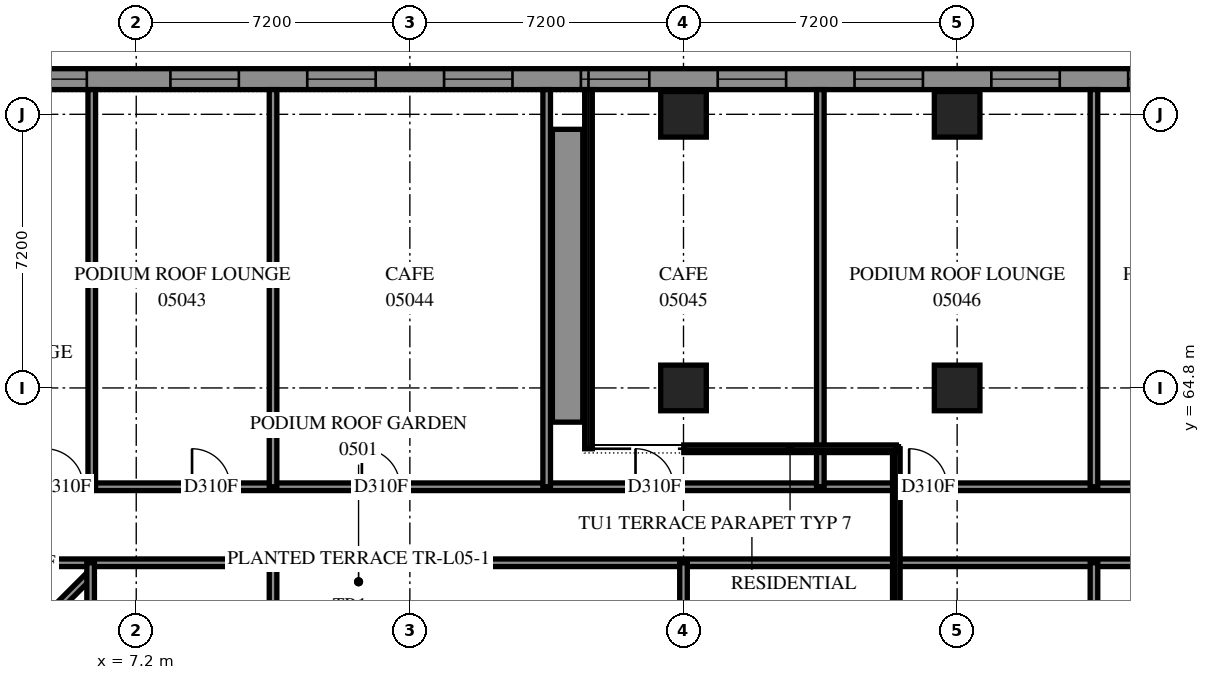
"""IFC4 building model, lengths in metres.
Left out: names, types, materials, properties, quantities, classifications, styles, units other than length and angle.
Written with IfcOpenShell. Run it as: python <this file> out.ifc"""

import sys

from ifc_helpers import new_model, si_unit, direction, frame, frame_2d, origin, origin_2d, place, context, subcontext, project, spatial, polyline, rectangle, outline, extrude, element, fill, save


model = new_model("IFC4")
c1 = context("Model", 3, precision=1e-05, world=origin(), true_north=direction((0.0, 1.0)))
c2 = subcontext(c1, "Body", "Model", "MODEL_VIEW")
j1 = project(units=[si_unit("LENGTHUNIT", "METRE"), si_unit("PLANEANGLEUNIT", "RADIAN")], contexts=[c1])
p1 = place(None, origin())
s1 = spatial("IfcSite", under=j1, at=p1, CompositionType="ELEMENT")
p2 = place(p1, origin())
s2 = spatial("IfcBuilding", under=s1, at=p2, CompositionType="ELEMENT")
p3 = place(p2, frame((0.0, 0.0, 22.8)))
s3 = spatial("IfcBuildingStorey", under=s2, at=p3, CompositionType="ELEMENT", Elevation=22.8)
for number, where, z_axis, x_axis in (
    (1, (21.6, 64.8, 0.0), (0.0, 0.0, 1.0), (1.0, 0.0, 0.0)),
    (2, (21.6, 72.0, 0.0), (0.0, 0.0, 1.0), (1.0, 0.0, 0.0)),
    (3, (28.8, 64.8, 0.0), (0.0, 0.0, 1.0), (1.0, 0.0, 0.0)),
    (4, (28.8, 72.0, 0.0), (0.0, 0.0, 1.0), (1.0, 0.0, 0.0)),
):
    element("IfcColumn", number, at=place(p3, frame(where, z_axis=z_axis, x_axis=x_axis)), inside=s3, PredefinedType="COLUMN", context=c2, shape_type="SweptSolid", body=[
        extrude(rectangle(XDim=1.2, YDim=1.2, at=origin_2d()), origin(), (0.0, 0.0, 1.0), 3.9),
    ])
p4 = place(p3, frame((79.583, 72.925, 0.0), z_axis=(0.0, 0.0, 1.0), x_axis=(-1.0, 0.0, 0.0)))
e5 = element("IfcWall", 5, at=p4, inside=s3, PredefinedType="SOLIDWALL", context=c2, shape_type="SweptSolid", body=[
    extrude(outline(polyline([(-0.114, -0.275), (79.583, -0.275), (79.033, 0.275), (0.114, 0.275), (-0.114, -0.275)])), origin(), (0.0, 0.0, 1.0), 3.9),
])
p5 = place(p4, frame((1.249, 0.0, 0.7)))
e6 = element("IfcOpeningElement", 6, at=p5, cuts=e5, PredefinedType="OPENING", context=c2, shape_type="SweptSolid", body=[
    extrude(rectangle(XDim=1.8, YDim=2.4, at=frame_2d((0.9, 1.2))), frame((0.0, 0.285, 0.0), z_axis=(0.0, -1.0, 0.0), x_axis=(1.0, 0.0, 0.0)), (0.0, 0.0, 1.0), 0.57),
])
p6 = place(p4, frame((4.883, 0.0, 0.7)))
e7 = element("IfcOpeningElement", 7, at=p6, cuts=e5, PredefinedType="OPENING", context=c2, shape_type="SweptSolid", body=[
    extrude(rectangle(XDim=1.8, YDim=2.4, at=frame_2d((0.9, 1.2))), frame((0.0, 0.285, 0.0), z_axis=(0.0, -1.0, 0.0), x_axis=(1.0, 0.0, 0.0)), (0.0, 0.0, 1.0), 0.57),
])
p7 = place(p4, frame((8.483, 0.0, 0.7)))
e8 = element("IfcOpeningElement", 8, at=p7, cuts=e5, PredefinedType="OPENING", context=c2, shape_type="SweptSolid", body=[
    extrude(rectangle(XDim=1.8, YDim=2.4, at=frame_2d((0.9, 1.2))), frame((0.0, 0.285, 0.0), z_axis=(0.0, -1.0, 0.0), x_axis=(1.0, 0.0, 0.0)), (0.0, 0.0, 1.0), 0.57),
])
p8 = place(p4, frame((12.083, 0.0, 0.7)))
e9 = element("IfcOpeningElement", 9, at=p8, cuts=e5, PredefinedType="OPENING", context=c2, shape_type="SweptSolid", body=[
    extrude(rectangle(XDim=1.8, YDim=2.4, at=frame_2d((0.9, 1.2))), frame((0.0, 0.285, 0.0), z_axis=(0.0, -1.0, 0.0), x_axis=(1.0, 0.0, 0.0)), (0.0, 0.0, 1.0), 0.57),
])
p9 = place(p4, frame((15.683, 0.0, 0.7)))
e10 = element("IfcOpeningElement", 10, at=p9, cuts=e5, PredefinedType="OPENING", context=c2, shape_type="SweptSolid", body=[
    extrude(rectangle(XDim=1.8, YDim=2.4, at=frame_2d((0.9, 1.2))), frame((0.0, 0.285, 0.0), z_axis=(0.0, -1.0, 0.0), x_axis=(1.0, 0.0, 0.0)), (0.0, 0.0, 1.0), 0.57),
])
p10 = place(p4, frame((19.283, 0.0, 0.7)))
e11 = element("IfcOpeningElement", 11, at=p10, cuts=e5, PredefinedType="OPENING", context=c2, shape_type="SweptSolid", body=[
    extrude(rectangle(XDim=1.8, YDim=2.4, at=frame_2d((0.9, 1.2))), frame((0.0, 0.285, 0.0), z_axis=(0.0, -1.0, 0.0), x_axis=(1.0, 0.0, 0.0)), (0.0, 0.0, 1.0), 0.57),
])
p11 = place(p4, frame((22.883, 0.0, 0.7)))
e12 = element("IfcOpeningElement", 12, at=p11, cuts=e5, PredefinedType="OPENING", context=c2, shape_type="SweptSolid", body=[
    extrude(rectangle(XDim=1.8, YDim=2.4, at=frame_2d((0.9, 1.2))), frame((0.0, 0.285, 0.0), z_axis=(0.0, -1.0, 0.0), x_axis=(1.0, 0.0, 0.0)), (0.0, 0.0, 1.0), 0.57),
])
p12 = place(p4, frame((26.483, 0.0, 0.7)))
e13 = element("IfcOpeningElement", 13, at=p12, cuts=e5, PredefinedType="OPENING", context=c2, shape_type="SweptSolid", body=[
    extrude(rectangle(XDim=1.8, YDim=2.4, at=frame_2d((0.9, 1.2))), frame((0.0, 0.285, 0.0), z_axis=(0.0, -1.0, 0.0), x_axis=(1.0, 0.0, 0.0)), (0.0, 0.0, 1.0), 0.57),
])
p13 = place(p4, frame((30.083, 0.0, 0.7)))
e14 = element("IfcOpeningElement", 14, at=p13, cuts=e5, PredefinedType="OPENING", context=c2, shape_type="SweptSolid", body=[
    extrude(rectangle(XDim=1.8, YDim=2.4, at=frame_2d((0.9, 1.2))), frame((0.0, 0.285, 0.0), z_axis=(0.0, -1.0, 0.0), x_axis=(1.0, 0.0, 0.0)), (0.0, 0.0, 1.0), 0.57),
])
p14 = place(p4, frame((33.683, 0.0, 0.7)))
e15 = element("IfcOpeningElement", 15, at=p14, cuts=e5, PredefinedType="OPENING", context=c2, shape_type="SweptSolid", body=[
    extrude(rectangle(XDim=1.8, YDim=2.4, at=frame_2d((0.9, 1.2))), frame((0.0, 0.285, 0.0), z_axis=(0.0, -1.0, 0.0), x_axis=(1.0, 0.0, 0.0)), (0.0, 0.0, 1.0), 0.57),
])
p15 = place(p4, frame((37.283, 0.0, 0.7)))
e16 = element("IfcOpeningElement", 16, at=p15, cuts=e5, PredefinedType="OPENING", context=c2, shape_type="SweptSolid", body=[
    extrude(rectangle(XDim=1.8, YDim=2.4, at=frame_2d((0.9, 1.2))), frame((0.0, 0.285, 0.0), z_axis=(0.0, -1.0, 0.0), x_axis=(1.0, 0.0, 0.0)), (0.0, 0.0, 1.0), 0.57),
])
p16 = place(p4, frame((40.883, 0.0, 0.7)))
e17 = element("IfcOpeningElement", 17, at=p16, cuts=e5, PredefinedType="OPENING", context=c2, shape_type="SweptSolid", body=[
    extrude(rectangle(XDim=1.8, YDim=2.4, at=frame_2d((0.9, 1.2))), frame((0.0, 0.285, 0.0), z_axis=(0.0, -1.0, 0.0), x_axis=(1.0, 0.0, 0.0)), (0.0, 0.0, 1.0), 0.57),
])
p17 = place(p4, frame((44.483, 0.0, 0.7)))
e18 = element("IfcOpeningElement", 18, at=p17, cuts=e5, PredefinedType="OPENING", context=c2, shape_type="SweptSolid", body=[
    extrude(rectangle(XDim=1.8, YDim=2.4, at=frame_2d((0.9, 1.2))), frame((0.0, 0.285, 0.0), z_axis=(0.0, -1.0, 0.0), x_axis=(1.0, 0.0, 0.0)), (0.0, 0.0, 1.0), 0.57),
])
p18 = place(p4, frame((48.083, 0.0, 0.7)))
e19 = element("IfcOpeningElement", 19, at=p18, cuts=e5, PredefinedType="OPENING", context=c2, shape_type="SweptSolid", body=[
    extrude(rectangle(XDim=1.8, YDim=2.4, at=frame_2d((0.9, 1.2))), frame((0.0, 0.285, 0.0), z_axis=(0.0, -1.0, 0.0), x_axis=(1.0, 0.0, 0.0)), (0.0, 0.0, 1.0), 0.57),
])
p19 = place(p4, frame((51.683, 0.0, 0.7)))
e20 = element("IfcOpeningElement", 20, at=p19, cuts=e5, PredefinedType="OPENING", context=c2, shape_type="SweptSolid", body=[
    extrude(rectangle(XDim=1.8, YDim=2.4, at=frame_2d((0.9, 1.2))), frame((0.0, 0.285, 0.0), z_axis=(0.0, -1.0, 0.0), x_axis=(1.0, 0.0, 0.0)), (0.0, 0.0, 1.0), 0.57),
])
p20 = place(p4, frame((55.283, 0.0, 0.7)))
e21 = element("IfcOpeningElement", 21, at=p20, cuts=e5, PredefinedType="OPENING", context=c2, shape_type="SweptSolid", body=[
    extrude(rectangle(XDim=1.8, YDim=2.4, at=frame_2d((0.9, 1.2))), frame((0.0, 0.285, 0.0), z_axis=(0.0, -1.0, 0.0), x_axis=(1.0, 0.0, 0.0)), (0.0, 0.0, 1.0), 0.57),
])
p21 = place(p4, frame((58.883, 0.0, 0.7)))
e22 = element("IfcOpeningElement", 22, at=p21, cuts=e5, PredefinedType="OPENING", context=c2, shape_type="SweptSolid", body=[
    extrude(rectangle(XDim=1.8, YDim=2.4, at=frame_2d((0.9, 1.2))), frame((0.0, 0.285, 0.0), z_axis=(0.0, -1.0, 0.0), x_axis=(1.0, 0.0, 0.0)), (0.0, 0.0, 1.0), 0.57),
])
p22 = place(p4, frame((62.483, 0.0, 0.7)))
e23 = element("IfcOpeningElement", 23, at=p22, cuts=e5, PredefinedType="OPENING", context=c2, shape_type="SweptSolid", body=[
    extrude(rectangle(XDim=1.8, YDim=2.4, at=frame_2d((0.9, 1.2))), frame((0.0, 0.285, 0.0), z_axis=(0.0, -1.0, 0.0), x_axis=(1.0, 0.0, 0.0)), (0.0, 0.0, 1.0), 0.57),
])
p23 = place(p4, frame((66.083, 0.0, 0.7)))
e24 = element("IfcOpeningElement", 24, at=p23, cuts=e5, PredefinedType="OPENING", context=c2, shape_type="SweptSolid", body=[
    extrude(rectangle(XDim=1.8, YDim=2.4, at=frame_2d((0.9, 1.2))), frame((0.0, 0.285, 0.0), z_axis=(0.0, -1.0, 0.0), x_axis=(1.0, 0.0, 0.0)), (0.0, 0.0, 1.0), 0.57),
])
p24 = place(p4, frame((69.683, 0.0, 0.7)))
e25 = element("IfcOpeningElement", 25, at=p24, cuts=e5, PredefinedType="OPENING", context=c2, shape_type="SweptSolid", body=[
    extrude(rectangle(XDim=1.8, YDim=2.4, at=frame_2d((0.9, 1.2))), frame((0.0, 0.285, 0.0), z_axis=(0.0, -1.0, 0.0), x_axis=(1.0, 0.0, 0.0)), (0.0, 0.0, 1.0), 0.57),
])
p25 = place(p4, frame((73.683, 0.0, 0.7)))
e26 = element("IfcOpeningElement", 26, at=p25, cuts=e5, PredefinedType="OPENING", context=c2, shape_type="SweptSolid", body=[
    extrude(rectangle(XDim=1.8, YDim=2.4, at=frame_2d((0.9, 1.2))), frame((0.0, 0.285, 0.0), z_axis=(0.0, -1.0, 0.0), x_axis=(1.0, 0.0, 0.0)), (0.0, 0.0, 1.0), 0.57),
])
p26 = place(p4, frame((76.508, 0.0, 0.7)))
e27 = element("IfcOpeningElement", 27, at=p26, cuts=e5, PredefinedType="OPENING", context=c2, shape_type="SweptSolid", body=[
    extrude(rectangle(XDim=1.8, YDim=2.4, at=frame_2d((0.9, 1.2))), frame((0.0, 0.285, 0.0), z_axis=(0.0, -1.0, 0.0), x_axis=(1.0, 0.0, 0.0)), (0.0, 0.0, 1.0), 0.57),
])
p27 = place(p3, frame((19.1, 63.2, 0.0), z_axis=(0.0, 0.0, 1.0), x_axis=(0.0, 1.0, 0.0)))
e28 = element("IfcWall", 28, at=p27, inside=s3, PredefinedType="PARAPET", context=c2, shape_type="SweptSolid", body=[
    extrude(outline(polyline([(0.1, -0.1), (9.45, -0.1), (9.45, 0.1), (-0.1, 0.1), (0.1, -0.1)])), origin(), (0.0, 0.0, 1.0), 0.25),
])
p28 = place(p3, frame((0.002, 60.2, 0.0), z_axis=(0.0, 0.0, 1.0), x_axis=(1.0, 0.0, 0.0)))
e29 = element("IfcWall", 29, at=p28, inside=s3, PredefinedType="PARTITIONING", context=c2, shape_type="SweptSolid", body=[
    extrude(rectangle(XDim=54.598, YDim=0.2, at=frame_2d((27.299, 0.0))), origin(), (0.0, 0.0, 1.0), 3.9),
])
p29 = place(p28, frame((3.863, 0.0, 0.0)))
e30 = element("IfcOpeningElement", 30, at=p29, cuts=e29, PredefinedType="OPENING", context=c2, shape_type="SweptSolid", body=[
    extrude(rectangle(XDim=1.0, YDim=2.1, at=frame_2d((0.5, 1.05))), frame((0.0, 0.11, 0.0), z_axis=(0.0, -1.0, 0.0), x_axis=(1.0, 0.0, 0.0)), (0.0, 0.0, 1.0), 0.22),
])
p30 = place(p3, frame((0.002, 62.2, 0.0), z_axis=(0.0, 0.0, 1.0), x_axis=(1.0, 0.0, 0.0)))
e31 = element("IfcWall", 31, at=p30, inside=s3, PredefinedType="PARTITIONING", context=c2, shape_type="SweptSolid", body=[
    extrude(rectangle(XDim=54.598, YDim=0.2, at=frame_2d((27.299, 0.0))), origin(), (0.0, 0.0, 1.0), 3.9),
])
p31 = place(p30, frame((8.667, 0.0, 0.0)))
e32 = element("IfcOpeningElement", 32, at=p31, cuts=e31, PredefinedType="OPENING", context=c2, shape_type="SweptSolid", body=[
    extrude(rectangle(XDim=1.0, YDim=2.1, at=frame_2d((0.5, 1.05))), frame((0.0, 0.11, 0.0), z_axis=(0.0, -1.0, 0.0), x_axis=(1.0, 0.0, 0.0)), (0.0, 0.0, 1.0), 0.22),
])
p32 = place(p30, frame((13.136, 0.0, 0.0)))
e33 = element("IfcOpeningElement", 33, at=p32, cuts=e31, PredefinedType="OPENING", context=c2, shape_type="SweptSolid", body=[
    extrude(rectangle(XDim=1.0, YDim=2.1, at=frame_2d((0.5, 1.05))), frame((0.0, 0.11, 0.0), z_axis=(0.0, -1.0, 0.0), x_axis=(1.0, 0.0, 0.0)), (0.0, 0.0, 1.0), 0.22),
])
p33 = place(p30, frame((20.335, 0.0, 0.0)))
e34 = element("IfcOpeningElement", 34, at=p33, cuts=e31, PredefinedType="OPENING", context=c2, shape_type="SweptSolid", body=[
    extrude(rectangle(XDim=1.0, YDim=2.1, at=frame_2d((0.5, 1.05))), frame((0.0, 0.11, 0.0), z_axis=(0.0, -1.0, 0.0), x_axis=(1.0, 0.0, 0.0)), (0.0, 0.0, 1.0), 0.22),
])
p34 = place(p30, frame((27.535, 0.0, 0.0)))
e35 = element("IfcOpeningElement", 35, at=p34, cuts=e31, PredefinedType="OPENING", context=c2, shape_type="SweptSolid", body=[
    extrude(rectangle(XDim=1.0, YDim=2.1, at=frame_2d((0.5, 1.05))), frame((0.0, 0.11, 0.0), z_axis=(0.0, -1.0, 0.0), x_axis=(1.0, 0.0, 0.0)), (0.0, 0.0, 1.0), 0.22),
])
p35 = place(p30, frame((34.736, 0.0, 0.0)))
e36 = element("IfcOpeningElement", 36, at=p35, cuts=e31, PredefinedType="OPENING", context=c2, shape_type="SweptSolid", body=[
    extrude(rectangle(XDim=1.0, YDim=2.1, at=frame_2d((0.5, 1.05))), frame((0.0, 0.11, 0.0), z_axis=(0.0, -1.0, 0.0), x_axis=(1.0, 0.0, 0.0)), (0.0, 0.0, 1.0), 0.22),
])
p36 = place(p30, frame((41.935, 0.0, 0.0)))
e37 = element("IfcOpeningElement", 37, at=p36, cuts=e31, PredefinedType="OPENING", context=c2, shape_type="SweptSolid", body=[
    extrude(rectangle(XDim=1.0, YDim=2.1, at=frame_2d((0.5, 1.05))), frame((0.0, 0.11, 0.0), z_axis=(0.0, -1.0, 0.0), x_axis=(1.0, 0.0, 0.0)), (0.0, 0.0, 1.0), 0.22),
])
p37 = place(p30, frame((49.136, 0.0, 0.0)))
e38 = element("IfcOpeningElement", 38, at=p37, cuts=e31, PredefinedType="OPENING", context=c2, shape_type="SweptSolid", body=[
    extrude(rectangle(XDim=1.0, YDim=2.1, at=frame_2d((0.5, 1.05))), frame((0.0, 0.11, 0.0), z_axis=(0.0, -1.0, 0.0), x_axis=(1.0, 0.0, 0.0)), (0.0, 0.0, 1.0), 0.22),
])
p38 = place(p30, frame((4.803, 0.0, 0.0)))
e39 = element("IfcOpeningElement", 39, at=p38, cuts=e31, PredefinedType="OPENING", context=c2, shape_type="SweptSolid", body=[
    extrude(rectangle(XDim=1.0, YDim=2.1, at=frame_2d((0.5, 1.05))), frame((0.0, 0.11, 0.0), z_axis=(0.0, -1.0, 0.0), x_axis=(1.0, 0.0, 0.0)), (0.0, 0.0, 1.0), 0.22),
])
for number, where, z_axis, x_axis in (
    (40, (6.03, 62.2, 0.0), (0.0, 0.0, 1.0), (0.0, 1.0, 0.0)),
    (41, (10.8, 62.2, 0.0), (0.0, 0.0, 1.0), (0.0, 1.0, 0.0)),
    (42, (18.0, 62.2, 0.0), (0.0, 0.0, 1.0), (0.0, 1.0, 0.0)),
    (43, (25.2, 62.2, 0.0), (0.0, 0.0, 1.0), (0.0, 1.0, 0.0)),
    (44, (32.4, 62.2, 0.0), (0.0, 0.0, 1.0), (0.0, 1.0, 0.0)),
):
    element("IfcWall", number, at=place(p3, frame(where, z_axis=z_axis, x_axis=x_axis)), inside=s3, PredefinedType="PARTITIONING", context=c2, shape_type="SweptSolid", body=[
        extrude(rectangle(XDim=10.45, YDim=0.2, at=frame_2d((5.225, 0.0))), origin(), (0.0, 0.0, 1.0), 3.9),
    ])
p39 = place(p3, frame((1.105, 55.001, 0.0), z_axis=(0.0, 0.0, 1.0), x_axis=(0.7071067812, 0.7071067812, 0.0)))
e45 = element("IfcWall", 45, at=p39, inside=s3, PredefinedType="PARTITIONING", context=c2, shape_type="SweptSolid", body=[
    extrude(rectangle(XDim=6.921, YDim=0.2, at=frame_2d((3.461, 0.0))), origin(), (0.0, 0.0, 1.0), 3.9),
])
for number, where, z_axis, x_axis in (
    (46, (6.0, 55.0, 0.0), (0.0, 0.0, 1.0), (0.0, 1.0, 0.0)),
    (47, (10.8, 55.0, 0.0), (0.0, 0.0, 1.0), (0.0, 1.0, 0.0)),
    (48, (32.4, 55.0, 0.0), (0.0, 0.0, 1.0), (0.0, 1.0, 0.0)),
):
    element("IfcWall", number, at=place(p3, frame(where, z_axis=z_axis, x_axis=x_axis)), inside=s3, PredefinedType="PARTITIONING", context=c2, shape_type="SweptSolid", body=[
        extrude(rectangle(XDim=5.2, YDim=0.2, at=frame_2d((2.6, 0.0))), origin(), (0.0, 0.0, 1.0), 3.9),
    ])
p40 = place(p3, frame((21.6, 58.2, 0.0), z_axis=(0.0, 0.0, 1.0), x_axis=(0.0, 1.0, 0.0)))
e49 = element("IfcWall", 49, at=p40, inside=s3, PredefinedType="PARTITIONING", context=c2, shape_type="SweptSolid", body=[
    extrude(rectangle(XDim=2.0, YDim=0.2, at=frame_2d((1.0, 0.0))), origin(), (0.0, 0.0, 1.0), 3.9),
])
p41 = place(p3, frame((27.2, 56.12, 0.0), z_axis=(0.0, 0.0, 1.0), x_axis=(0.0, 1.0, 0.0)))
e50 = element("IfcWall", 50, at=p41, inside=s3, PredefinedType="PARAPET", context=c2, shape_type="SweptSolid", body=[
    extrude(outline(polyline([(0.0, -0.1), (7.18, -0.1), (6.98, 0.1), (0.0, 0.1), (0.0, -0.1)])), origin(), (0.0, 0.0, 1.0), 0.25),
])
p42 = place(p3, frame((27.2, 63.2, 0.0), z_axis=(0.0, 0.0, 1.0), x_axis=(-1.0, 0.0, 0.0)))
e51 = element("IfcWall", 51, at=p42, inside=s3, PredefinedType="PARAPET", context=c2, shape_type="SweptSolid", body=[
    extrude(outline(polyline([(-0.1, -0.1), (5.593, -0.1), (5.593, 0.1), (0.1, 0.1), (-0.1, -0.1)])), origin(), (0.0, 0.0, 1.0), 0.25),
])
p43 = place(p3, frame((18.55, 63.9, 0.0), z_axis=(0.0, 0.0, 1.0), x_axis=(0.0, 1.0, 0.0)))
e52 = element("IfcWall", 52, at=p43, inside=s3, PredefinedType="SOLIDWALL", context=c2, shape_type="SweptSolid", body=[
    extrude(outline(polyline([(0.0, -0.4), (7.705, -0.4), (7.705, 0.4), (0.0, 0.4), (0.0, -0.4)])), origin(), (0.0, 0.0, 1.0), 0.65),
])
p44 = place(p17, origin())
e53 = element("IfcWindow", 53, at=p44, inside=s3, PartitioningType="SINGLE_PANEL", PredefinedType="WINDOW", context=c2, shape_type="SweptSolid", body=[
    extrude(rectangle(XDim=1.8, YDim=2.4, at=frame_2d((0.9, 1.2))), frame((0.0, 0.155, 0.0), z_axis=(0.0, -1.0, 0.0), x_axis=(1.0, 0.0, 0.0)), (0.0, 0.0, 1.0), 0.06),
])
fill(e18, e53)
p45 = place(p18, origin())
e54 = element("IfcWindow", 54, at=p45, inside=s3, PartitioningType="SINGLE_PANEL", PredefinedType="WINDOW", context=c2, shape_type="SweptSolid", body=[
    extrude(rectangle(XDim=1.8, YDim=2.4, at=frame_2d((0.9, 1.2))), frame((0.0, 0.155, 0.0), z_axis=(0.0, -1.0, 0.0), x_axis=(1.0, 0.0, 0.0)), (0.0, 0.0, 1.0), 0.06),
])
fill(e19, e54)
p46 = place(p19, origin())
e55 = element("IfcWindow", 55, at=p46, inside=s3, PartitioningType="SINGLE_PANEL", PredefinedType="WINDOW", context=c2, shape_type="SweptSolid", body=[
    extrude(rectangle(XDim=1.8, YDim=2.4, at=frame_2d((0.9, 1.2))), frame((0.0, 0.155, 0.0), z_axis=(0.0, -1.0, 0.0), x_axis=(1.0, 0.0, 0.0)), (0.0, 0.0, 1.0), 0.06),
])
fill(e20, e55)
p47 = place(p20, origin())
e56 = element("IfcWindow", 56, at=p47, inside=s3, PartitioningType="SINGLE_PANEL", PredefinedType="WINDOW", context=c2, shape_type="SweptSolid", body=[
    extrude(rectangle(XDim=1.8, YDim=2.4, at=frame_2d((0.9, 1.2))), frame((0.0, 0.155, 0.0), z_axis=(0.0, -1.0, 0.0), x_axis=(1.0, 0.0, 0.0)), (0.0, 0.0, 1.0), 0.06),
])
fill(e21, e56)
p48 = place(p21, origin())
e57 = element("IfcWindow", 57, at=p48, inside=s3, PartitioningType="SINGLE_PANEL", PredefinedType="WINDOW", context=c2, shape_type="SweptSolid", body=[
    extrude(rectangle(XDim=1.8, YDim=2.4, at=frame_2d((0.9, 1.2))), frame((0.0, 0.155, 0.0), z_axis=(0.0, -1.0, 0.0), x_axis=(1.0, 0.0, 0.0)), (0.0, 0.0, 1.0), 0.06),
])
fill(e22, e57)
p49 = place(p22, origin())
e58 = element("IfcWindow", 58, at=p49, inside=s3, PartitioningType="SINGLE_PANEL", PredefinedType="WINDOW", context=c2, shape_type="SweptSolid", body=[
    extrude(rectangle(XDim=1.8, YDim=2.4, at=frame_2d((0.9, 1.2))), frame((0.0, 0.155, 0.0), z_axis=(0.0, -1.0, 0.0), x_axis=(1.0, 0.0, 0.0)), (0.0, 0.0, 1.0), 0.06),
])
fill(e23, e58)
p50 = place(p23, origin())
e59 = element("IfcWindow", 59, at=p50, inside=s3, PartitioningType="SINGLE_PANEL", PredefinedType="WINDOW", context=c2, shape_type="SweptSolid", body=[
    extrude(rectangle(XDim=1.8, YDim=2.4, at=frame_2d((0.9, 1.2))), frame((0.0, 0.155, 0.0), z_axis=(0.0, -1.0, 0.0), x_axis=(1.0, 0.0, 0.0)), (0.0, 0.0, 1.0), 0.06),
])
fill(e24, e59)
p51 = place(p24, origin())
e60 = element("IfcWindow", 60, at=p51, inside=s3, PartitioningType="SINGLE_PANEL", PredefinedType="WINDOW", context=c2, shape_type="SweptSolid", body=[
    extrude(rectangle(XDim=1.8, YDim=2.4, at=frame_2d((0.9, 1.2))), frame((0.0, 0.155, 0.0), z_axis=(0.0, -1.0, 0.0), x_axis=(1.0, 0.0, 0.0)), (0.0, 0.0, 1.0), 0.06),
])
fill(e25, e60)
p52 = place(p25, origin())
e61 = element("IfcWindow", 61, at=p52, inside=s3, PartitioningType="SINGLE_PANEL", PredefinedType="WINDOW", context=c2, shape_type="SweptSolid", body=[
    extrude(rectangle(XDim=1.8, YDim=2.4, at=frame_2d((0.9, 1.2))), frame((0.0, 0.155, 0.0), z_axis=(0.0, -1.0, 0.0), x_axis=(1.0, 0.0, 0.0)), (0.0, 0.0, 1.0), 0.06),
])
fill(e26, e61)
p53 = place(p31, origin())
e62 = element("IfcDoor", 62, at=p53, inside=s3, OperationType="SINGLE_SWING_RIGHT", PredefinedType="DOOR", context=c2, shape_type="SweptSolid", body=[
    extrude(rectangle(XDim=1.0, YDim=2.1, at=frame_2d((0.5, 1.05))), frame((0.0, 0.025, 0.0), z_axis=(0.0, -1.0, 0.0), x_axis=(1.0, 0.0, 0.0)), (0.0, 0.0, 1.0), 0.05),
])
fill(e32, e62)
p54 = place(p32, origin())
e63 = element("IfcDoor", 63, at=p54, inside=s3, OperationType="SINGLE_SWING_LEFT", PredefinedType="DOOR", context=c2, shape_type="SweptSolid", body=[
    extrude(rectangle(XDim=1.0, YDim=2.1, at=frame_2d((0.5, 1.05))), frame((0.0, 0.025, 0.0), z_axis=(0.0, -1.0, 0.0), x_axis=(1.0, 0.0, 0.0)), (0.0, 0.0, 1.0), 0.05),
])
fill(e33, e63)
p55 = place(p33, origin())
e64 = element("IfcDoor", 64, at=p55, inside=s3, OperationType="SINGLE_SWING_LEFT", PredefinedType="DOOR", context=c2, shape_type="SweptSolid", body=[
    extrude(rectangle(XDim=1.0, YDim=2.1, at=frame_2d((0.5, 1.05))), frame((0.0, 0.025, 0.0), z_axis=(0.0, -1.0, 0.0), x_axis=(1.0, 0.0, 0.0)), (0.0, 0.0, 1.0), 0.05),
])
fill(e34, e64)
p56 = place(p34, origin())
e65 = element("IfcDoor", 65, at=p56, inside=s3, OperationType="SINGLE_SWING_LEFT", PredefinedType="DOOR", context=c2, shape_type="SweptSolid", body=[
    extrude(rectangle(XDim=1.0, YDim=2.1, at=frame_2d((0.5, 1.05))), frame((0.0, 0.025, 0.0), z_axis=(0.0, -1.0, 0.0), x_axis=(1.0, 0.0, 0.0)), (0.0, 0.0, 1.0), 0.05),
])
fill(e35, e65)
p57 = place(p38, origin())
e66 = element("IfcDoor", 66, at=p57, inside=s3, OperationType="SINGLE_SWING_LEFT", PredefinedType="DOOR", context=c2, shape_type="SweptSolid", body=[
    extrude(rectangle(XDim=1.0, YDim=2.1, at=frame_2d((0.5, 1.05))), frame((0.0, 0.025, 0.0), z_axis=(0.0, -1.0, 0.0), x_axis=(1.0, 0.0, 0.0)), (0.0, 0.0, 1.0), 0.05),
])
fill(e39, e66)
save(model, sys.argv[1])
